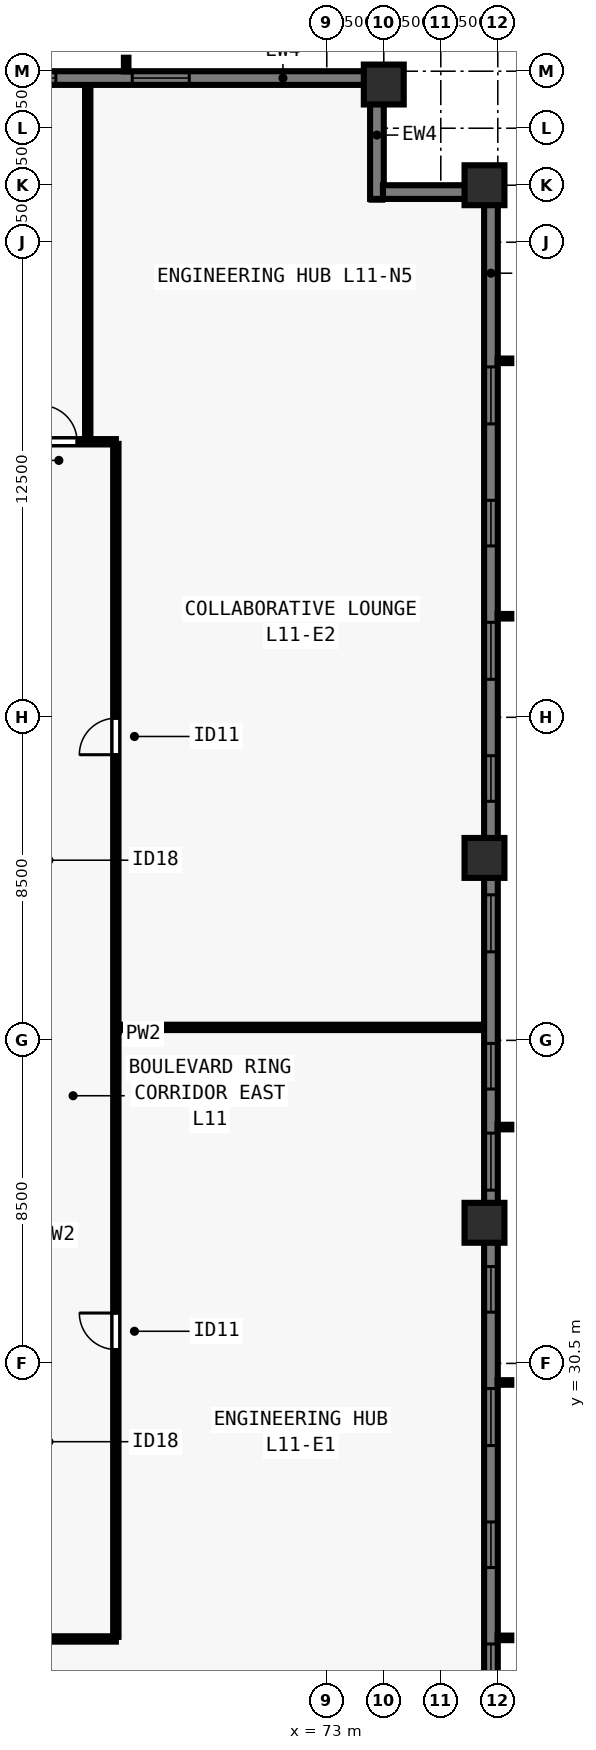
"""IFC4 building model, lengths in metres.
Left out: names, types, materials, properties, quantities, classifications, styles, units other than length and angle.
Written with IfcOpenShell. Run it as: python <this file> out.ifc"""

import sys

from ifc_helpers import new_model, si_unit, direction, frame, frame_2d, origin, origin_2d, place, context, subcontext, project, spatial, rectangle, extrude, element, fill, save


model = new_model("IFC4")
c1 = context("Model", 3, precision=1e-05, world=origin(), true_north=direction((0.0, 1.0)))
c2 = subcontext(c1, "Body", "Model", "MODEL_VIEW")
j1 = project(units=[si_unit("LENGTHUNIT", "METRE"), si_unit("PLANEANGLEUNIT", "RADIAN")], contexts=[c1])
p1 = place(None, origin())
s1 = spatial("IfcSite", under=j1, at=p1, CompositionType="ELEMENT")
p2 = place(p1, origin())
s2 = spatial("IfcBuilding", under=s1, at=p2, CompositionType="ELEMENT")
p3 = place(p2, frame((0.0, 0.0, 44.5)))
s3 = spatial("IfcBuildingStorey", under=s2, at=p3, CompositionType="ELEMENT", Elevation=44.5)
for number, where, z_axis, x_axis in (
    (1, (77.15, 34.2, 0.0), (0.0, 0.0, 1.0), (0.0, 1.0, 0.0)),
    (2, (77.15, 43.8, 0.0), (0.0, 0.0, 1.0), (0.0, 1.0, 0.0)),
    (3, (77.15, 61.5, 0.0), (0.0, 0.0, 1.0), (0.0, 1.0, 0.0)),
    (4, (74.5, 64.15, 0.0), (0.0, 0.0, 1.0), (1.0, 0.0, 0.0)),
):
    element("IfcColumn", number, at=place(p3, frame(where, z_axis=z_axis, x_axis=x_axis)), inside=s3, PredefinedType="COLUMN", context=c2, shape_type="SweptSolid", body=[
        extrude(rectangle(XDim=1.05, YDim=1.05, at=origin_2d()), origin(), (0.0, 0.0, 1.0), 3.5),
    ])
p4 = place(p3, frame((29.5, 64.32, 0.0), z_axis=(0.0, 0.0, 1.0), x_axis=(1.0, 0.0, 0.0)))
e5 = element("IfcWall", 5, at=p4, inside=s3, PredefinedType="SOLIDWALL", context=c2, shape_type="SweptSolid", body=[
    extrude(rectangle(XDim=44.662, YDim=0.36, at=frame_2d((22.331, 0.0))), origin(), (0.0, 0.0, 1.0), 3.28),
])
p5 = place(p4, frame((4.78, 0.0, 0.8)))
e6 = element("IfcOpeningElement", 6, at=p5, cuts=e5, PredefinedType="OPENING", context=c2, shape_type="SweptSolid", body=[
    extrude(rectangle(XDim=1.5, YDim=1.544, at=frame_2d((0.75, 0.772))), frame((0.0, 0.19, 0.0), z_axis=(0.0, -1.0, 0.0), x_axis=(1.0, 0.0, 0.0)), (0.0, 0.0, 1.0), 0.38),
])
p6 = place(p4, frame((8.29, 0.0, 0.8)))
e7 = element("IfcOpeningElement", 7, at=p6, cuts=e5, PredefinedType="OPENING", context=c2, shape_type="SweptSolid", body=[
    extrude(rectangle(XDim=1.2, YDim=1.544, at=frame_2d((0.6, 0.772))), frame((0.0, 0.19, 0.0), z_axis=(0.0, -1.0, 0.0), x_axis=(1.0, 0.0, 0.0)), (0.0, 0.0, 1.0), 0.38),
])
p7 = place(p4, frame((11.5, 0.0, 0.8)))
e8 = element("IfcOpeningElement", 8, at=p7, cuts=e5, PredefinedType="OPENING", context=c2, shape_type="SweptSolid", body=[
    extrude(rectangle(XDim=1.5, YDim=1.544, at=frame_2d((0.75, 0.772))), frame((0.0, 0.19, 0.0), z_axis=(0.0, -1.0, 0.0), x_axis=(1.0, 0.0, 0.0)), (0.0, 0.0, 1.0), 0.38),
])
p8 = place(p4, frame((15.01, 0.0, 0.8)))
e9 = element("IfcOpeningElement", 9, at=p8, cuts=e5, PredefinedType="OPENING", context=c2, shape_type="SweptSolid", body=[
    extrude(rectangle(XDim=1.2, YDim=1.544, at=frame_2d((0.6, 0.772))), frame((0.0, 0.19, 0.0), z_axis=(0.0, -1.0, 0.0), x_axis=(1.0, 0.0, 0.0)), (0.0, 0.0, 1.0), 0.38),
])
p9 = place(p4, frame((18.671, 0.0, 0.8)))
e10 = element("IfcOpeningElement", 10, at=p9, cuts=e5, PredefinedType="OPENING", context=c2, shape_type="SweptSolid", body=[
    extrude(rectangle(XDim=1.5, YDim=1.544, at=frame_2d((0.75, 0.772))), frame((0.0, 0.19, 0.0), z_axis=(0.0, -1.0, 0.0), x_axis=(1.0, 0.0, 0.0)), (0.0, 0.0, 1.0), 0.38),
])
p10 = place(p4, frame((21.731, 0.0, 0.8)))
e11 = element("IfcOpeningElement", 11, at=p10, cuts=e5, PredefinedType="OPENING", context=c2, shape_type="SweptSolid", body=[
    extrude(rectangle(XDim=1.2, YDim=1.544, at=frame_2d((0.6, 0.772))), frame((0.0, 0.19, 0.0), z_axis=(0.0, -1.0, 0.0), x_axis=(1.0, 0.0, 0.0)), (0.0, 0.0, 1.0), 0.38),
])
p11 = place(p4, frame((24.941, 0.0, 0.8)))
e12 = element("IfcOpeningElement", 12, at=p11, cuts=e5, PredefinedType="OPENING", context=c2, shape_type="SweptSolid", body=[
    extrude(rectangle(XDim=1.5, YDim=1.544, at=frame_2d((0.75, 0.772))), frame((0.0, 0.19, 0.0), z_axis=(0.0, -1.0, 0.0), x_axis=(1.0, 0.0, 0.0)), (0.0, 0.0, 1.0), 0.38),
])
p12 = place(p4, frame((28.451, 0.0, 0.8)))
e13 = element("IfcOpeningElement", 13, at=p12, cuts=e5, PredefinedType="OPENING", context=c2, shape_type="SweptSolid", body=[
    extrude(rectangle(XDim=1.2, YDim=1.544, at=frame_2d((0.6, 0.772))), frame((0.0, 0.19, 0.0), z_axis=(0.0, -1.0, 0.0), x_axis=(1.0, 0.0, 0.0)), (0.0, 0.0, 1.0), 0.38),
])
p13 = place(p4, frame((31.662, 0.0, 0.8)))
e14 = element("IfcOpeningElement", 14, at=p13, cuts=e5, PredefinedType="OPENING", context=c2, shape_type="SweptSolid", body=[
    extrude(rectangle(XDim=1.5, YDim=1.544, at=frame_2d((0.75, 0.772))), frame((0.0, 0.19, 0.0), z_axis=(0.0, -1.0, 0.0), x_axis=(1.0, 0.0, 0.0)), (0.0, 0.0, 1.0), 0.38),
])
p14 = place(p4, frame((35.172, 0.0, 0.8)))
e15 = element("IfcOpeningElement", 15, at=p14, cuts=e5, PredefinedType="OPENING", context=c2, shape_type="SweptSolid", body=[
    extrude(rectangle(XDim=1.2, YDim=1.544, at=frame_2d((0.6, 0.772))), frame((0.0, 0.19, 0.0), z_axis=(0.0, -1.0, 0.0), x_axis=(1.0, 0.0, 0.0)), (0.0, 0.0, 1.0), 0.38),
])
p15 = place(p4, frame((38.382, 0.0, 0.8)))
e16 = element("IfcOpeningElement", 16, at=p15, cuts=e5, PredefinedType="OPENING", context=c2, shape_type="SweptSolid", body=[
    extrude(rectangle(XDim=1.5, YDim=1.544, at=frame_2d((0.75, 0.772))), frame((0.0, 0.19, 0.0), z_axis=(0.0, -1.0, 0.0), x_axis=(1.0, 0.0, 0.0)), (0.0, 0.0, 1.0), 0.38),
])
p16 = place(p3, frame((74.32, 64.5, 0.0), z_axis=(0.0, 0.0, 1.0), x_axis=(0.0, -1.0, 0.0)))
e17 = element("IfcWall", 17, at=p16, inside=s3, PredefinedType="SOLIDWALL", context=c2, shape_type="SweptSolid", body=[
    extrude(rectangle(XDim=3.36, YDim=0.36, at=frame_2d((1.68, 0.0))), origin(), (0.0, 0.0, 1.0), 3.28),
])
p17 = place(p3, frame((74.478, 61.32, 0.0), z_axis=(0.0, 0.0, 1.0), x_axis=(1.0, 0.0, 0.0)))
e18 = element("IfcWall", 18, at=p17, inside=s3, PredefinedType="SOLIDWALL", context=c2, shape_type="SweptSolid", body=[
    extrude(rectangle(XDim=2.684, YDim=0.36, at=frame_2d((1.342, 0.0))), origin(), (0.0, 0.0, 1.0), 3.28),
])
p18 = place(p3, frame((77.32, 61.5, 0.0), z_axis=(0.0, 0.0, 1.0), x_axis=(0.0, -1.0, 0.0)))
e19 = element("IfcWall", 19, at=p18, inside=s3, PredefinedType="SOLIDWALL", context=c2, shape_type="SweptSolid", body=[
    extrude(rectangle(XDim=44.662, YDim=0.36, at=frame_2d((22.331, 0.0))), origin(), (0.0, 0.0, 1.0), 3.28),
])
p19 = place(p18, frame((4.78, 0.0, 0.8)))
e20 = element("IfcOpeningElement", 20, at=p19, cuts=e19, PredefinedType="OPENING", context=c2, shape_type="SweptSolid", body=[
    extrude(rectangle(XDim=1.5, YDim=1.544, at=frame_2d((0.75, 0.772))), frame((0.0, 0.19, 0.0), z_axis=(0.0, -1.0, 0.0), x_axis=(1.0, 0.0, 0.0)), (0.0, 0.0, 1.0), 0.38),
])
p20 = place(p18, frame((8.29, 0.0, 0.8)))
e21 = element("IfcOpeningElement", 21, at=p20, cuts=e19, PredefinedType="OPENING", context=c2, shape_type="SweptSolid", body=[
    extrude(rectangle(XDim=1.2, YDim=1.544, at=frame_2d((0.6, 0.772))), frame((0.0, 0.19, 0.0), z_axis=(0.0, -1.0, 0.0), x_axis=(1.0, 0.0, 0.0)), (0.0, 0.0, 1.0), 0.38),
])
p21 = place(p18, frame((11.5, 0.0, 0.8)))
e22 = element("IfcOpeningElement", 22, at=p21, cuts=e19, PredefinedType="OPENING", context=c2, shape_type="SweptSolid", body=[
    extrude(rectangle(XDim=1.5, YDim=1.544, at=frame_2d((0.75, 0.772))), frame((0.0, 0.19, 0.0), z_axis=(0.0, -1.0, 0.0), x_axis=(1.0, 0.0, 0.0)), (0.0, 0.0, 1.0), 0.38),
])
p22 = place(p18, frame((15.01, 0.0, 0.8)))
e23 = element("IfcOpeningElement", 23, at=p22, cuts=e19, PredefinedType="OPENING", context=c2, shape_type="SweptSolid", body=[
    extrude(rectangle(XDim=1.2, YDim=1.544, at=frame_2d((0.6, 0.772))), frame((0.0, 0.19, 0.0), z_axis=(0.0, -1.0, 0.0), x_axis=(1.0, 0.0, 0.0)), (0.0, 0.0, 1.0), 0.38),
])
p23 = place(p18, frame((18.671, 0.0, 0.8)))
e24 = element("IfcOpeningElement", 24, at=p23, cuts=e19, PredefinedType="OPENING", context=c2, shape_type="SweptSolid", body=[
    extrude(rectangle(XDim=1.5, YDim=1.544, at=frame_2d((0.75, 0.772))), frame((0.0, 0.19, 0.0), z_axis=(0.0, -1.0, 0.0), x_axis=(1.0, 0.0, 0.0)), (0.0, 0.0, 1.0), 0.38),
])
p24 = place(p18, frame((22.581, 0.0, 0.8)))
e25 = element("IfcOpeningElement", 25, at=p24, cuts=e19, PredefinedType="OPENING", context=c2, shape_type="SweptSolid", body=[
    extrude(rectangle(XDim=1.2, YDim=1.544, at=frame_2d((0.6, 0.772))), frame((0.0, 0.19, 0.0), z_axis=(0.0, -1.0, 0.0), x_axis=(1.0, 0.0, 0.0)), (0.0, 0.0, 1.0), 0.38),
])
p25 = place(p18, frame((24.941, 0.0, 0.8)))
e26 = element("IfcOpeningElement", 26, at=p25, cuts=e19, PredefinedType="OPENING", context=c2, shape_type="SweptSolid", body=[
    extrude(rectangle(XDim=1.5, YDim=1.544, at=frame_2d((0.75, 0.772))), frame((0.0, 0.19, 0.0), z_axis=(0.0, -1.0, 0.0), x_axis=(1.0, 0.0, 0.0)), (0.0, 0.0, 1.0), 0.38),
])
p26 = place(p18, frame((28.451, 0.0, 0.8)))
e27 = element("IfcOpeningElement", 27, at=p26, cuts=e19, PredefinedType="OPENING", context=c2, shape_type="SweptSolid", body=[
    extrude(rectangle(XDim=1.2, YDim=1.544, at=frame_2d((0.6, 0.772))), frame((0.0, 0.19, 0.0), z_axis=(0.0, -1.0, 0.0), x_axis=(1.0, 0.0, 0.0)), (0.0, 0.0, 1.0), 0.38),
])
p27 = place(p18, frame((31.662, 0.0, 0.8)))
e28 = element("IfcOpeningElement", 28, at=p27, cuts=e19, PredefinedType="OPENING", context=c2, shape_type="SweptSolid", body=[
    extrude(rectangle(XDim=1.5, YDim=1.544, at=frame_2d((0.75, 0.772))), frame((0.0, 0.19, 0.0), z_axis=(0.0, -1.0, 0.0), x_axis=(1.0, 0.0, 0.0)), (0.0, 0.0, 1.0), 0.38),
])
p28 = place(p18, frame((35.172, 0.0, 0.8)))
e29 = element("IfcOpeningElement", 29, at=p28, cuts=e19, PredefinedType="OPENING", context=c2, shape_type="SweptSolid", body=[
    extrude(rectangle(XDim=1.2, YDim=1.544, at=frame_2d((0.6, 0.772))), frame((0.0, 0.19, 0.0), z_axis=(0.0, -1.0, 0.0), x_axis=(1.0, 0.0, 0.0)), (0.0, 0.0, 1.0), 0.38),
])
p29 = place(p18, frame((38.382, 0.0, 0.8)))
e30 = element("IfcOpeningElement", 30, at=p29, cuts=e19, PredefinedType="OPENING", context=c2, shape_type="SweptSolid", body=[
    extrude(rectangle(XDim=1.5, YDim=1.544, at=frame_2d((0.75, 0.772))), frame((0.0, 0.19, 0.0), z_axis=(0.0, -1.0, 0.0), x_axis=(1.0, 0.0, 0.0)), (0.0, 0.0, 1.0), 0.38),
])
p30 = place(p3, frame((36.55, 23.25, 0.0), z_axis=(0.0, 0.0, 1.0), x_axis=(1.0, 0.0, 0.0)))
e31 = element("IfcWall", 31, at=p30, inside=s3, PredefinedType="PARTITIONING", context=c2, shape_type="SweptSolid", body=[
    extrude(rectangle(XDim=30.9, YDim=0.14, at=frame_2d((15.45, 0.0))), origin(), (0.0, 0.0, 1.0), 3.28),
])
p31 = place(p30, frame((2.386, 0.0, 0.0)))
e32 = element("IfcOpeningElement", 32, at=p31, cuts=e31, PredefinedType="OPENING", context=c2, shape_type="SweptSolid", body=[
    extrude(rectangle(XDim=0.96, YDim=2.12, at=frame_2d((0.48, 1.06))), frame((0.0, 0.08, 0.0), z_axis=(0.0, -1.0, 0.0), x_axis=(1.0, 0.0, 0.0)), (0.0, 0.0, 1.0), 0.16),
])
p32 = place(p30, frame((27.066, 0.0, 0.0)))
e33 = element("IfcOpeningElement", 33, at=p32, cuts=e31, PredefinedType="OPENING", context=c2, shape_type="SweptSolid", body=[
    extrude(rectangle(XDim=0.96, YDim=2.12, at=frame_2d((0.48, 1.06))), frame((0.0, 0.08, 0.0), z_axis=(0.0, -1.0, 0.0), x_axis=(1.0, 0.0, 0.0)), (0.0, 0.0, 1.0), 0.16),
])
p33 = place(p3, frame((36.55, 54.75, 0.0), z_axis=(0.0, 0.0, 1.0), x_axis=(1.0, 0.0, 0.0)))
e34 = element("IfcWall", 34, at=p33, inside=s3, PredefinedType="PARTITIONING", context=c2, shape_type="SweptSolid", body=[
    extrude(rectangle(XDim=30.9, YDim=0.14, at=frame_2d((15.45, 0.0))), origin(), (0.0, 0.0, 1.0), 3.28),
])
p34 = place(p33, frame((3.69, 0.0, 0.0)))
e35 = element("IfcOpeningElement", 35, at=p34, cuts=e34, PredefinedType="OPENING", context=c2, shape_type="SweptSolid", body=[
    extrude(rectangle(XDim=0.96, YDim=2.12, at=frame_2d((0.48, 1.06))), frame((0.0, 0.08, 0.0), z_axis=(0.0, -1.0, 0.0), x_axis=(1.0, 0.0, 0.0)), (0.0, 0.0, 1.0), 0.16),
])
p35 = place(p33, frame((5.013, 0.0, 0.0)))
e36 = element("IfcOpeningElement", 36, at=p35, cuts=e34, PredefinedType="OPENING", context=c2, shape_type="SweptSolid", body=[
    extrude(rectangle(XDim=0.96, YDim=2.12, at=frame_2d((0.48, 1.06))), frame((0.0, 0.08, 0.0), z_axis=(0.0, -1.0, 0.0), x_axis=(1.0, 0.0, 0.0)), (0.0, 0.0, 1.0), 0.16),
])
p36 = place(p33, frame((15.045, 0.0, 0.0)))
e37 = element("IfcOpeningElement", 37, at=p36, cuts=e34, PredefinedType="OPENING", context=c2, shape_type="SweptSolid", body=[
    extrude(rectangle(XDim=0.96, YDim=2.12, at=frame_2d((0.48, 1.06))), frame((0.0, 0.08, 0.0), z_axis=(0.0, -1.0, 0.0), x_axis=(1.0, 0.0, 0.0)), (0.0, 0.0, 1.0), 0.16),
])
p37 = place(p33, frame((25.077, 0.0, 0.0)))
e38 = element("IfcOpeningElement", 38, at=p37, cuts=e34, PredefinedType="OPENING", context=c2, shape_type="SweptSolid", body=[
    extrude(rectangle(XDim=0.96, YDim=2.12, at=frame_2d((0.48, 1.06))), frame((0.0, 0.08, 0.0), z_axis=(0.0, -1.0, 0.0), x_axis=(1.0, 0.0, 0.0)), (0.0, 0.0, 1.0), 0.16),
])
p38 = place(p33, frame((28.92, 0.0, 0.0)))
e39 = element("IfcOpeningElement", 39, at=p38, cuts=e34, PredefinedType="OPENING", context=c2, shape_type="SweptSolid", body=[
    extrude(rectangle(XDim=0.96, YDim=2.12, at=frame_2d((0.48, 1.06))), frame((0.0, 0.08, 0.0), z_axis=(0.0, -1.0, 0.0), x_axis=(1.0, 0.0, 0.0)), (0.0, 0.0, 1.0), 0.16),
])
p39 = place(p3, frame((67.45, 23.305, 0.0), z_axis=(0.0, 0.0, 1.0), x_axis=(0.0, 1.0, 0.0)))
e40 = element("IfcWall", 40, at=p39, inside=s3, PredefinedType="PARTITIONING", context=c2, shape_type="SweptSolid", body=[
    extrude(rectangle(XDim=31.39, YDim=0.14, at=frame_2d((15.695, 0.0))), origin(), (0.0, 0.0, 1.0), 3.28),
])
p40 = place(p39, frame((7.561, 0.0, 0.0)))
e41 = element("IfcOpeningElement", 41, at=p40, cuts=e40, PredefinedType="OPENING", context=c2, shape_type="SweptSolid", body=[
    extrude(rectangle(XDim=0.96, YDim=2.12, at=frame_2d((0.48, 1.06))), frame((0.0, 0.08, 0.0), z_axis=(0.0, -1.0, 0.0), x_axis=(1.0, 0.0, 0.0)), (0.0, 0.0, 1.0), 0.16),
])
p41 = place(p39, frame((23.211, 0.0, 0.0)))
e42 = element("IfcOpeningElement", 42, at=p41, cuts=e40, PredefinedType="OPENING", context=c2, shape_type="SweptSolid", body=[
    extrude(rectangle(XDim=0.96, YDim=2.12, at=frame_2d((0.48, 1.06))), frame((0.0, 0.08, 0.0), z_axis=(0.0, -1.0, 0.0), x_axis=(1.0, 0.0, 0.0)), (0.0, 0.0, 1.0), 0.16),
])
p42 = place(p3, frame((66.71, 54.85, 0.0), z_axis=(0.0, 0.0, 1.0), x_axis=(0.0, 1.0, 0.0)))
e43 = element("IfcWall", 43, at=p42, inside=s3, PredefinedType="PARTITIONING", context=c2, shape_type="SweptSolid", body=[
    extrude(rectangle(XDim=9.23, YDim=0.14, at=frame_2d((4.615, 0.0))), origin(), (0.0, 0.0, 1.0), 2.439),
])
p43 = place(p3, frame((67.55, 39.341, 0.0), z_axis=(0.0, 0.0, 1.0), x_axis=(1.0, 0.0, 0.0)))
e44 = element("IfcWall", 44, at=p43, inside=s3, PredefinedType="PARTITIONING", context=c2, shape_type="SweptSolid", body=[
    extrude(rectangle(XDim=9.53, YDim=0.14, at=frame_2d((4.765, 0.0))), origin(), (0.0, 0.0, 1.0), 3.28),
])
p44 = place(p14, origin())
e45 = element("IfcWindow", 45, at=p44, inside=s3, PartitioningType="SINGLE_PANEL", PredefinedType="WINDOW", context=c2, shape_type="SweptSolid", body=[
    extrude(rectangle(XDim=1.2, YDim=1.544, at=frame_2d((0.6, 0.772))), frame((0.0, -0.05, 0.0), z_axis=(0.0, -1.0, 0.0), x_axis=(1.0, 0.0, 0.0)), (0.0, 0.0, 1.0), 0.06),
])
fill(e15, e45)
p45 = place(p15, origin())
e46 = element("IfcWindow", 46, at=p45, inside=s3, PartitioningType="SINGLE_PANEL", PredefinedType="WINDOW", context=c2, shape_type="SweptSolid", body=[
    extrude(rectangle(XDim=1.5, YDim=1.544, at=frame_2d((0.75, 0.772))), frame((0.0, -0.05, 0.0), z_axis=(0.0, -1.0, 0.0), x_axis=(1.0, 0.0, 0.0)), (0.0, 0.0, 1.0), 0.06),
])
fill(e16, e46)
p46 = place(p19, origin())
e47 = element("IfcWindow", 47, at=p46, inside=s3, PartitioningType="SINGLE_PANEL", PredefinedType="WINDOW", context=c2, shape_type="SweptSolid", body=[
    extrude(rectangle(XDim=1.5, YDim=1.544, at=frame_2d((0.75, 0.772))), frame((0.0, -0.05, 0.0), z_axis=(0.0, -1.0, 0.0), x_axis=(1.0, 0.0, 0.0)), (0.0, 0.0, 1.0), 0.06),
])
fill(e20, e47)
p47 = place(p20, origin())
e48 = element("IfcWindow", 48, at=p47, inside=s3, PartitioningType="SINGLE_PANEL", PredefinedType="WINDOW", context=c2, shape_type="SweptSolid", body=[
    extrude(rectangle(XDim=1.2, YDim=1.544, at=frame_2d((0.6, 0.772))), frame((0.0, -0.05, 0.0), z_axis=(0.0, -1.0, 0.0), x_axis=(1.0, 0.0, 0.0)), (0.0, 0.0, 1.0), 0.06),
])
fill(e21, e48)
p48 = place(p21, origin())
e49 = element("IfcWindow", 49, at=p48, inside=s3, PartitioningType="SINGLE_PANEL", PredefinedType="WINDOW", context=c2, shape_type="SweptSolid", body=[
    extrude(rectangle(XDim=1.5, YDim=1.544, at=frame_2d((0.75, 0.772))), frame((0.0, -0.05, 0.0), z_axis=(0.0, -1.0, 0.0), x_axis=(1.0, 0.0, 0.0)), (0.0, 0.0, 1.0), 0.06),
])
fill(e22, e49)
p49 = place(p22, origin())
e50 = element("IfcWindow", 50, at=p49, inside=s3, PartitioningType="SINGLE_PANEL", PredefinedType="WINDOW", context=c2, shape_type="SweptSolid", body=[
    extrude(rectangle(XDim=1.2, YDim=1.544, at=frame_2d((0.6, 0.772))), frame((0.0, -0.05, 0.0), z_axis=(0.0, -1.0, 0.0), x_axis=(1.0, 0.0, 0.0)), (0.0, 0.0, 1.0), 0.06),
])
fill(e23, e50)
p50 = place(p23, origin())
e51 = element("IfcWindow", 51, at=p50, inside=s3, PartitioningType="SINGLE_PANEL", PredefinedType="WINDOW", context=c2, shape_type="SweptSolid", body=[
    extrude(rectangle(XDim=1.5, YDim=1.544, at=frame_2d((0.75, 0.772))), frame((0.0, -0.05, 0.0), z_axis=(0.0, -1.0, 0.0), x_axis=(1.0, 0.0, 0.0)), (0.0, 0.0, 1.0), 0.06),
])
fill(e24, e51)
p51 = place(p24, origin())
e52 = element("IfcWindow", 52, at=p51, inside=s3, PartitioningType="SINGLE_PANEL", PredefinedType="WINDOW", context=c2, shape_type="SweptSolid", body=[
    extrude(rectangle(XDim=1.2, YDim=1.544, at=frame_2d((0.6, 0.772))), frame((0.0, -0.05, 0.0), z_axis=(0.0, -1.0, 0.0), x_axis=(1.0, 0.0, 0.0)), (0.0, 0.0, 1.0), 0.06),
])
fill(e25, e52)
p52 = place(p25, origin())
e53 = element("IfcWindow", 53, at=p52, inside=s3, PartitioningType="SINGLE_PANEL", PredefinedType="WINDOW", context=c2, shape_type="SweptSolid", body=[
    extrude(rectangle(XDim=1.5, YDim=1.544, at=frame_2d((0.75, 0.772))), frame((0.0, -0.05, 0.0), z_axis=(0.0, -1.0, 0.0), x_axis=(1.0, 0.0, 0.0)), (0.0, 0.0, 1.0), 0.06),
])
fill(e26, e53)
p53 = place(p26, origin())
e54 = element("IfcWindow", 54, at=p53, inside=s3, PartitioningType="SINGLE_PANEL", PredefinedType="WINDOW", context=c2, shape_type="SweptSolid", body=[
    extrude(rectangle(XDim=1.2, YDim=1.544, at=frame_2d((0.6, 0.772))), frame((0.0, -0.05, 0.0), z_axis=(0.0, -1.0, 0.0), x_axis=(1.0, 0.0, 0.0)), (0.0, 0.0, 1.0), 0.06),
])
fill(e27, e54)
p54 = place(p27, origin())
e55 = element("IfcWindow", 55, at=p54, inside=s3, PartitioningType="SINGLE_PANEL", PredefinedType="WINDOW", context=c2, shape_type="SweptSolid", body=[
    extrude(rectangle(XDim=1.5, YDim=1.544, at=frame_2d((0.75, 0.772))), frame((0.0, -0.05, 0.0), z_axis=(0.0, -1.0, 0.0), x_axis=(1.0, 0.0, 0.0)), (0.0, 0.0, 1.0), 0.06),
])
fill(e28, e55)
p55 = place(p28, origin())
e56 = element("IfcWindow", 56, at=p55, inside=s3, PartitioningType="SINGLE_PANEL", PredefinedType="WINDOW", context=c2, shape_type="SweptSolid", body=[
    extrude(rectangle(XDim=1.2, YDim=1.544, at=frame_2d((0.6, 0.772))), frame((0.0, -0.05, 0.0), z_axis=(0.0, -1.0, 0.0), x_axis=(1.0, 0.0, 0.0)), (0.0, 0.0, 1.0), 0.06),
])
fill(e29, e56)
p56 = place(p29, origin())
e57 = element("IfcWindow", 57, at=p56, inside=s3, PartitioningType="SINGLE_PANEL", PredefinedType="WINDOW", context=c2, shape_type="SweptSolid", body=[
    extrude(rectangle(XDim=1.5, YDim=1.544, at=frame_2d((0.75, 0.772))), frame((0.0, -0.05, 0.0), z_axis=(0.0, -1.0, 0.0), x_axis=(1.0, 0.0, 0.0)), (0.0, 0.0, 1.0), 0.06),
])
fill(e30, e57)
p57 = place(p38, origin())
e58 = element("IfcDoor", 58, at=p57, inside=s3, OperationType="SINGLE_SWING_LEFT", PredefinedType="DOOR", context=c2, shape_type="SweptSolid", body=[
    extrude(rectangle(XDim=0.96, YDim=2.12, at=frame_2d((0.48, 1.06))), frame((0.0, 0.025, 0.0), z_axis=(0.0, -1.0, 0.0), x_axis=(1.0, 0.0, 0.0)), (0.0, 0.0, 1.0), 0.05),
])
fill(e39, e58)
p58 = place(p40, origin())
e59 = element("IfcDoor", 59, at=p58, inside=s3, OperationType="SINGLE_SWING_RIGHT", PredefinedType="DOOR", context=c2, shape_type="SweptSolid", body=[
    extrude(rectangle(XDim=0.96, YDim=2.12, at=frame_2d((0.48, 1.06))), frame((0.0, 0.025, 0.0), z_axis=(0.0, -1.0, 0.0), x_axis=(1.0, 0.0, 0.0)), (0.0, 0.0, 1.0), 0.05),
])
fill(e41, e59)
p59 = place(p41, origin())
e60 = element("IfcDoor", 60, at=p59, inside=s3, OperationType="SINGLE_SWING_LEFT", PredefinedType="DOOR", context=c2, shape_type="SweptSolid", body=[
    extrude(rectangle(XDim=0.96, YDim=2.12, at=frame_2d((0.48, 1.06))), frame((0.0, 0.025, 0.0), z_axis=(0.0, -1.0, 0.0), x_axis=(1.0, 0.0, 0.0)), (0.0, 0.0, 1.0), 0.05),
])
fill(e42, e60)
save(model, sys.argv[1])
